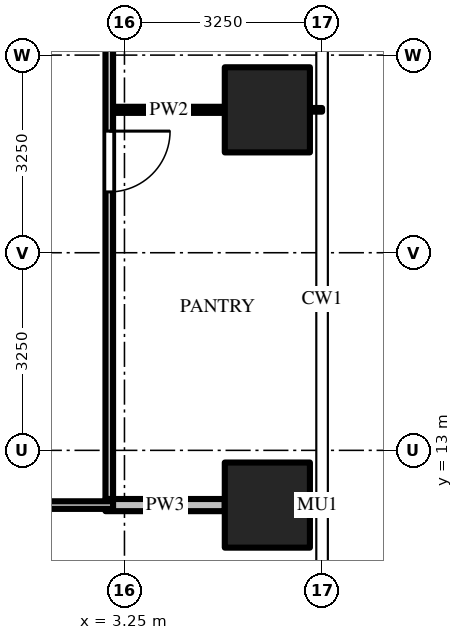
"""IFC4 building model, lengths in metres.
Left out: names, types, materials, properties, quantities, classifications, styles, units other than length and angle.
Written with IfcOpenShell. Run it as: python <this file> out.ifc"""

import sys

from ifc_helpers import new_model, si_unit, direction, frame, frame_2d, origin, origin_2d, place, context, subcontext, project, spatial, rectangle, extrude, source, transform, mapped, element, fill, save


model = new_model("IFC4")
c1 = context("Model", 3, precision=1e-05, world=origin(), true_north=direction((0.0, 1.0)))
c2 = subcontext(c1, "Body", "Model", "MODEL_VIEW")
j1 = project(units=[si_unit("LENGTHUNIT", "METRE"), si_unit("PLANEANGLEUNIT", "RADIAN")], contexts=[c1])
p1 = place(None, origin())
s1 = spatial("IfcSite", under=j1, at=p1, CompositionType="ELEMENT")
p2 = place(p1, origin())
s2 = spatial("IfcBuilding", under=s1, at=p2, CompositionType="ELEMENT")
p3 = place(p2, frame((0.0, 0.0, 79.0)))
s3 = spatial("IfcBuildingStorey", under=s2, at=p3, CompositionType="ELEMENT", Elevation=79.0)
m1 = source(origin(), c2, "Body", "SweptSolid", [
    extrude(rectangle(XDim=1.4, YDim=1.4, at=origin_2d()), origin(), (0.0, 0.0, 1.0), 4.5),
])
for number, where, z_axis, x_axis in (
    (1, (5.6, 12.1, 0.0), (0.0, 0.0, 1.0), (1.0, 0.0, 0.0)),
    (2, (5.6, 18.6, 0.0), (0.0, 0.0, 1.0), (1.0, 0.0, 0.0)),
):
    element("IfcColumn", number, at=place(p3, frame(where, z_axis=z_axis, x_axis=x_axis)), inside=s3, PredefinedType="COLUMN", context=c2, shape_type="MappedRepresentation", body=[
        mapped(m1, transform((0.0, 0.0, 0.0))),
    ])
m2 = source(origin(), c2, "Body", "SweptSolid", [
    extrude(rectangle(XDim=8.738, YDim=0.125, at=frame_2d((4.369, 0.0))), origin(), (0.0, 0.0, 1.0), 3.468),
])
p4 = place(p3, frame((3.0, 20.938, 0.0), z_axis=(0.0, 0.0, 1.0), x_axis=(0.0, -1.0, 0.0)))
e3 = element("IfcWall", 3, at=p4, inside=s3, PredefinedType="PARTITIONING", context=c2, shape_type="MappedRepresentation", body=[
    mapped(m2, transform((0.0, 0.0, 0.0))),
])
m3 = source(origin(), c2, "Body", "SweptSolid", [
    extrude(rectangle(XDim=1.0, YDim=2.1, at=frame_2d((0.5, 1.05))), frame((0.0, 0.073, 0.0), z_axis=(0.0, -1.0, 0.0), x_axis=(1.0, 0.0, 0.0)), (0.0, 0.0, 1.0), 0.145),
])
p5 = place(p4, frame((2.688, 0.0, 0.0)))
e4 = element("IfcOpeningElement", 4, at=p5, cuts=e3, PredefinedType="OPENING", context=c2, shape_type="MappedRepresentation", body=[
    mapped(m3, transform((0.0, 0.0, 0.0))),
])
m4 = source(origin(), c2, "Body", "SweptSolid", [
    extrude(rectangle(XDim=1.962, YDim=0.2, at=frame_2d((0.981, 0.0))), origin(), (0.0, 0.0, 1.0), 3.468),
])
p6 = place(p3, frame((2.938, 12.1, 0.0), z_axis=(0.0, 0.0, 1.0), x_axis=(1.0, 0.0, 0.0)))
e5 = element("IfcWall", 5, at=p6, inside=s3, PredefinedType="PARTITIONING", context=c2, shape_type="MappedRepresentation", body=[
    mapped(m4, transform((0.0, 0.0, 0.0))),
])
m5 = source(origin(), c2, "Body", "SweptSolid", [
    extrude(rectangle(XDim=1.925, YDim=0.125, at=frame_2d((0.962, 0.0))), origin(), (0.0, 0.0, 1.0), 3.468),
])
p7 = place(p3, frame((3.062, 12.1, 0.0), z_axis=(0.0, 0.0, 1.0), x_axis=(-1.0, 0.0, 0.0)))
e6 = element("IfcWall", 6, at=p7, inside=s3, PredefinedType="PARTITIONING", context=c2, shape_type="MappedRepresentation", body=[
    mapped(m5, transform((0.0, 0.0, 0.0))),
])
m6 = source(origin(), c2, "Body", "SweptSolid", [
    extrude(rectangle(XDim=1.837, YDim=0.1, at=frame_2d((0.919, 0.0))), origin(), (0.0, 0.0, 1.0), 3.697),
])
p8 = place(p3, frame((3.062, 18.6, 0.0), z_axis=(0.0, 0.0, 1.0), x_axis=(1.0, 0.0, 0.0)))
e7 = element("IfcWall", 7, at=p8, inside=s3, PredefinedType="PARTITIONING", context=c2, shape_type="MappedRepresentation", body=[
    mapped(m6, transform((0.0, 0.0, 0.0))),
])
m7 = source(origin(), c2, "Body", "SweptSolid", [
    extrude(rectangle(XDim=1.0, YDim=2.1, at=frame_2d((0.5, 1.05))), frame((0.0, 0.025, 0.0), z_axis=(0.0, -1.0, 0.0), x_axis=(1.0, 0.0, 0.0)), (0.0, 0.0, 1.0), 0.05),
])
p9 = place(p5, origin())
e8 = element("IfcDoor", 8, at=p9, inside=s3, OperationType="SINGLE_SWING_LEFT", PredefinedType="DOOR", context=c2, shape_type="MappedRepresentation", body=[
    mapped(m7, transform((0.0, 0.0, 0.0))),
])
fill(e4, e8)
save(model, sys.argv[1])
